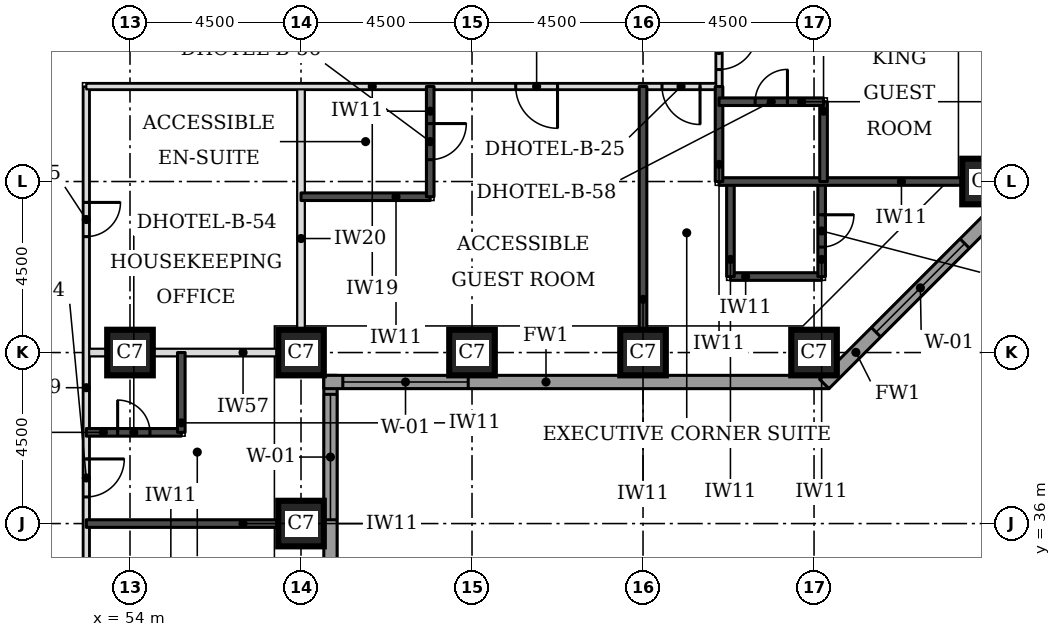
"""IFC4 building model, lengths in metres.
Left out: names, types, materials, properties, quantities, classifications, styles, units other than length and angle.
Written with IfcOpenShell. Run it as: python <this file> out.ifc"""

import sys

from ifc_helpers import new_model, si_unit, direction, frame, frame_2d, origin, origin_2d, place, context, subcontext, project, spatial, rectangle, extrude, element, fill, save


model = new_model("IFC4")
c1 = context("Model", 3, precision=1e-05, world=origin(), true_north=direction((0.0, 1.0)))
c2 = subcontext(c1, "Body", "Model", "MODEL_VIEW")
j1 = project(units=[si_unit("LENGTHUNIT", "METRE"), si_unit("PLANEANGLEUNIT", "RADIAN")], contexts=[c1])
p1 = place(None, origin())
s1 = spatial("IfcSite", under=j1, at=p1, CompositionType="ELEMENT")
p2 = place(p1, origin())
s2 = spatial("IfcBuilding", under=s1, at=p2, CompositionType="ELEMENT")
p3 = place(p2, frame((0.0, 0.0, 52.8)))
s3 = spatial("IfcBuildingStorey", under=s2, at=p3, CompositionType="ELEMENT", Elevation=52.8)
for number, where, z_axis, x_axis in (
    (1, (58.5, 36.0, 0.0), (0.0, 0.0, 1.0), (1.0, 0.0, 0.0)),
    (2, (54.0, 40.5, 0.0), (0.0, 0.0, 1.0), (1.0, 0.0, 0.0)),
    (3, (58.5, 40.5, 0.0), (0.0, 0.0, 1.0), (1.0, 0.0, 0.0)),
    (4, (63.0, 40.5, 0.0), (0.0, 0.0, 1.0), (1.0, 0.0, 0.0)),
    (5, (67.5, 40.5, 0.0), (0.0, 0.0, 1.0), (1.0, 0.0, 0.0)),
    (6, (72.0, 40.5, 0.0), (0.0, 0.0, 1.0), (1.0, 0.0, 0.0)),
    (7, (76.5, 45.0, 0.0), (0.0, 0.0, 1.0), (1.0, 0.0, 0.0)),
):
    element("IfcColumn", number, at=place(p3, frame(where, z_axis=z_axis, x_axis=x_axis)), inside=s3, PredefinedType="COLUMN", context=c2, shape_type="SweptSolid", body=[
        extrude(rectangle(XDim=1.2, YDim=1.2, at=origin_2d()), origin(), (0.0, 0.0, 1.0), 3.3),
    ])
p4 = place(p3, frame((59.275, 22.106, 0.0), z_axis=(0.0, 0.0, 1.0), x_axis=(0.0, 1.0, 0.0)))
e8 = element("IfcWall", 8, at=p4, inside=s3, PredefinedType="STANDARD", context=c2, shape_type="SweptSolid", body=[
    extrude(rectangle(XDim=17.793, YDim=0.35, at=frame_2d((8.897, 0.0))), origin(), (0.0, 0.0, 1.0), 3.055),
])
p5 = place(p4, frame((5.493, 0.0, 0.8)))
e9 = element("IfcOpeningElement", 9, at=p5, cuts=e8, PredefinedType="OPENING", context=c2, shape_type="SweptSolid", body=[
    extrude(rectangle(XDim=3.3, YDim=1.5, at=frame_2d((1.65, 0.75))), frame((0.0, 0.185, 0.0), z_axis=(0.0, -1.0, 0.0), x_axis=(1.0, 0.0, 0.0)), (0.0, 0.0, 1.0), 0.37),
])
p6 = place(p4, frame((13.993, 0.0, 0.8)))
e10 = element("IfcOpeningElement", 10, at=p6, cuts=e8, PredefinedType="OPENING", context=c2, shape_type="SweptSolid", body=[
    extrude(rectangle(XDim=3.3, YDim=1.5, at=frame_2d((1.65, 0.75))), frame((0.0, 0.185, 0.0), z_axis=(0.0, -1.0, 0.0), x_axis=(1.0, 0.0, 0.0)), (0.0, 0.0, 1.0), 0.37),
])
p7 = place(p3, frame((59.1, 39.725, 0.0), z_axis=(0.0, 0.0, 1.0), x_axis=(1.0, 0.0, 0.0)))
e11 = element("IfcWall", 11, at=p7, inside=s3, PredefinedType="STANDARD", context=c2, shape_type="SweptSolid", body=[
    extrude(rectangle(XDim=13.293, YDim=0.35, at=frame_2d((6.647, 0.0))), origin(), (0.0, 0.0, 1.0), 3.055),
])
p8 = place(p7, frame((0.5, 0.0, 0.8)))
e12 = element("IfcOpeningElement", 12, at=p8, cuts=e11, PredefinedType="OPENING", context=c2, shape_type="SweptSolid", body=[
    extrude(rectangle(XDim=3.3, YDim=1.5, at=frame_2d((1.65, 0.75))), frame((0.0, 0.185, 0.0), z_axis=(0.0, -1.0, 0.0), x_axis=(1.0, 0.0, 0.0)), (0.0, 0.0, 1.0), 0.37),
])
p9 = place(p3, frame((72.27, 39.674, 0.0), z_axis=(0.0, 0.0, 1.0), x_axis=(0.707106781187, 0.707106781187, 0.0)))
e13 = element("IfcWall", 13, at=p9, inside=s3, PredefinedType="STANDARD", context=c2, shape_type="SweptSolid", body=[
    extrude(rectangle(XDim=7.151, YDim=0.35, at=frame_2d((3.576, 0.0))), origin(), (0.0, 0.0, 1.0), 3.055),
])
p10 = place(p9, frame((1.926, 0.0, 0.8)))
e14 = element("IfcOpeningElement", 14, at=p10, cuts=e13, PredefinedType="OPENING", context=c2, shape_type="SweptSolid", body=[
    extrude(rectangle(XDim=3.3, YDim=1.5, at=frame_2d((1.65, 0.75))), frame((0.0, 0.185, 0.0), z_axis=(0.0, -1.0, 0.0), x_axis=(1.0, 0.0, 0.0)), (0.0, 0.0, 1.0), 0.37),
])
p11 = place(p3, frame((52.85, 40.5, 0.0), z_axis=(0.0, 0.0, 1.0), x_axis=(1.0, 0.0, 0.0)))
e15 = element("IfcWall", 15, at=p11, inside=s3, PredefinedType="PARTITIONING", context=c2, shape_type="SweptSolid", body=[
    extrude(rectangle(XDim=5.05, YDim=0.2, at=frame_2d((2.525, 0.0))), origin(), (0.0, 0.0, 1.0), 2.33),
])
p12 = place(p3, frame((58.5, 41.1, 0.0), z_axis=(0.0, 0.0, 1.0), x_axis=(0.0, 1.0, 0.0)))
e16 = element("IfcWall", 16, at=p12, inside=s3, PredefinedType="PARTITIONING", context=c2, shape_type="SweptSolid", body=[
    extrude(rectangle(XDim=6.4, YDim=0.2, at=frame_2d((3.2, 0.0))), origin(), (0.0, 0.0, 1.0), 3.08),
])
p13 = place(p3, frame((52.85, 23.65, 0.0), z_axis=(0.0, 0.0, 1.0), x_axis=(0.0, 1.0, 0.0)))
e17 = element("IfcWall", 17, at=p13, inside=s3, PredefinedType="PARTITIONING", context=c2, shape_type="SweptSolid", body=[
    extrude(rectangle(XDim=23.85, YDim=0.15, at=frame_2d((11.925, 0.0))), origin(), (0.0, 0.0, 1.0), 3.08),
])
p14 = place(p13, frame((1.65, 0.0, 0.0)))
e18 = element("IfcOpeningElement", 18, at=p14, cuts=e17, PredefinedType="OPENING", context=c2, shape_type="SweptSolid", body=[
    extrude(rectangle(XDim=1.0, YDim=2.1, at=frame_2d((0.5, 1.05))), frame((0.0, 0.085, 0.0), z_axis=(0.0, -1.0, 0.0), x_axis=(1.0, 0.0, 0.0)), (0.0, 0.0, 1.0), 0.17),
])
p15 = place(p13, frame((8.95, 0.0, 0.0)))
e19 = element("IfcOpeningElement", 19, at=p15, cuts=e17, PredefinedType="OPENING", context=c2, shape_type="SweptSolid", body=[
    extrude(rectangle(XDim=1.0, YDim=2.1, at=frame_2d((0.5, 1.05))), frame((0.0, 0.085, 0.0), z_axis=(0.0, -1.0, 0.0), x_axis=(1.0, 0.0, 0.0)), (0.0, 0.0, 1.0), 0.17),
])
p16 = place(p13, frame((13.05, 0.0, 0.0)))
e20 = element("IfcOpeningElement", 20, at=p16, cuts=e17, PredefinedType="OPENING", context=c2, shape_type="SweptSolid", body=[
    extrude(rectangle(XDim=1.0, YDim=2.1, at=frame_2d((0.5, 1.05))), frame((0.0, 0.085, 0.0), z_axis=(0.0, -1.0, 0.0), x_axis=(1.0, 0.0, 0.0)), (0.0, 0.0, 1.0), 0.17),
])
p17 = place(p13, frame((19.9, 0.0, 0.0)))
e21 = element("IfcOpeningElement", 21, at=p17, cuts=e17, PredefinedType="OPENING", context=c2, shape_type="SweptSolid", body=[
    extrude(rectangle(XDim=0.9, YDim=2.1, at=frame_2d((0.45, 1.05))), frame((0.0, 0.085, 0.0), z_axis=(0.0, -1.0, 0.0), x_axis=(1.0, 0.0, 0.0)), (0.0, 0.0, 1.0), 0.17),
])
p18 = place(p3, frame((52.85, 47.5, 0.0), z_axis=(0.0, 0.0, 1.0), x_axis=(1.0, 0.0, 0.0)))
e22 = element("IfcWall", 22, at=p18, inside=s3, PredefinedType="PARTITIONING", context=c2, shape_type="SweptSolid", body=[
    extrude(rectangle(XDim=16.65, YDim=0.15, at=frame_2d((8.325, 0.0))), origin(), (0.0, 0.0, 1.0), 3.08),
])
p19 = place(p18, frame((11.3, 0.0, 0.0)))
e23 = element("IfcOpeningElement", 23, at=p19, cuts=e22, PredefinedType="OPENING", context=c2, shape_type="SweptSolid", body=[
    extrude(rectangle(XDim=1.1, YDim=2.1, at=frame_2d((0.55, 1.05))), frame((0.0, 0.085, 0.0), z_axis=(0.0, -1.0, 0.0), x_axis=(1.0, 0.0, 0.0)), (0.0, 0.0, 1.0), 0.17),
])
p20 = place(p18, frame((15.15, 0.0, 0.0)))
e24 = element("IfcOpeningElement", 24, at=p20, cuts=e22, PredefinedType="OPENING", context=c2, shape_type="SweptSolid", body=[
    extrude(rectangle(XDim=1.0, YDim=2.1, at=frame_2d((0.5, 1.05))), frame((0.0, 0.085, 0.0), z_axis=(0.0, -1.0, 0.0), x_axis=(1.0, 0.0, 0.0)), (0.0, 0.0, 1.0), 0.17),
])
p21 = place(p3, frame((69.5, 47.5, 0.0), z_axis=(0.0, 0.0, 1.0), x_axis=(0.0, 1.0, 0.0)))
e25 = element("IfcWall", 25, at=p21, inside=s3, PredefinedType="PARTITIONING", context=c2, shape_type="SweptSolid", body=[
    extrude(rectangle(XDim=26.5, YDim=0.15, at=frame_2d((13.25, 0.0))), origin(), (0.0, 0.0, 1.0), 3.08),
])
p22 = place(p21, frame((24.95, 0.0, 0.0)))
e26 = element("IfcOpeningElement", 26, at=p22, cuts=e25, PredefinedType="OPENING", context=c2, shape_type="SweptSolid", body=[
    extrude(rectangle(XDim=1.0, YDim=2.1, at=frame_2d((0.5, 1.05))), frame((0.0, 0.085, 0.0), z_axis=(0.0, -1.0, 0.0), x_axis=(1.0, 0.0, 0.0)), (0.0, 0.0, 1.0), 0.17),
])
p23 = place(p21, frame((20.7, 0.0, 0.0)))
e27 = element("IfcOpeningElement", 27, at=p23, cuts=e25, PredefinedType="OPENING", context=c2, shape_type="SweptSolid", body=[
    extrude(rectangle(XDim=1.0, YDim=2.1, at=frame_2d((0.5, 1.05))), frame((0.0, 0.085, 0.0), z_axis=(0.0, -1.0, 0.0), x_axis=(1.0, 0.0, 0.0)), (0.0, 0.0, 1.0), 0.17),
])
p24 = place(p21, frame((18.55, 0.0, 0.0)))
e28 = element("IfcOpeningElement", 28, at=p24, cuts=e25, PredefinedType="OPENING", context=c2, shape_type="SweptSolid", body=[
    extrude(rectangle(XDim=1.0, YDim=2.1, at=frame_2d((0.5, 1.05))), frame((0.0, 0.085, 0.0), z_axis=(0.0, -1.0, 0.0), x_axis=(1.0, 0.0, 0.0)), (0.0, 0.0, 1.0), 0.17),
])
p25 = place(p21, frame((11.7, 0.0, 0.0)))
e29 = element("IfcOpeningElement", 29, at=p25, cuts=e25, PredefinedType="OPENING", context=c2, shape_type="SweptSolid", body=[
    extrude(rectangle(XDim=1.0, YDim=2.1, at=frame_2d((0.5, 1.05))), frame((0.0, 0.085, 0.0), z_axis=(0.0, -1.0, 0.0), x_axis=(1.0, 0.0, 0.0)), (0.0, 0.0, 1.0), 0.17),
])
p26 = place(p21, frame((7.65, 0.0, 0.0)))
e30 = element("IfcOpeningElement", 30, at=p26, cuts=e25, PredefinedType="OPENING", context=c2, shape_type="SweptSolid", body=[
    extrude(rectangle(XDim=1.1, YDim=2.1, at=frame_2d((0.55, 1.05))), frame((0.0, 0.085, 0.0), z_axis=(0.0, -1.0, 0.0), x_axis=(1.0, 0.0, 0.0)), (0.0, 0.0, 1.0), 0.17),
])
p27 = place(p21, frame((0.447, 0.0, 0.0)))
e31 = element("IfcOpeningElement", 31, at=p27, cuts=e25, PredefinedType="OPENING", context=c2, shape_type="SweptSolid", body=[
    extrude(rectangle(XDim=1.0, YDim=2.1, at=frame_2d((0.5, 1.05))), frame((0.0, 0.085, 0.0), z_axis=(0.0, -1.0, 0.0), x_axis=(1.0, 0.0, 0.0)), (0.0, 0.0, 1.0), 0.17),
])
p28 = place(p3, frame((52.85, 36.0, 0.0), z_axis=(0.0, 0.0, 1.0), x_axis=(1.0, 0.0, 0.0)))
e32 = element("IfcWall", 32, at=p28, inside=s3, PredefinedType="SOLIDWALL", context=c2, shape_type="SweptSolid", body=[
    extrude(rectangle(XDim=5.05, YDim=0.2, at=frame_2d((2.525, 0.0))), origin(), (0.0, 0.0, 1.0), 3.08),
])
p29 = place(p3, frame((52.85, 38.4, 0.0), z_axis=(0.0, 0.0, 1.0), x_axis=(1.0, 0.0, 0.0)))
e33 = element("IfcWall", 33, at=p29, inside=s3, PredefinedType="SOLIDWALL", context=c2, shape_type="SweptSolid", body=[
    extrude(rectangle(XDim=2.5, YDim=0.2, at=frame_2d((1.25, 0.0))), origin(), (0.0, 0.0, 1.0), 3.08),
])
p30 = place(p29, frame((0.825, 0.0, 0.0)))
e34 = element("IfcOpeningElement", 34, at=p30, cuts=e33, PredefinedType="OPENING", context=c2, shape_type="SweptSolid", body=[
    extrude(rectangle(XDim=0.85, YDim=2.1, at=frame_2d((0.425, 1.05))), frame((0.0, 0.11, 0.0), z_axis=(0.0, -1.0, 0.0), x_axis=(1.0, 0.0, 0.0)), (0.0, 0.0, 1.0), 0.22),
])
p31 = place(p3, frame((55.35, 38.4, 0.0), z_axis=(0.0, 0.0, 1.0), x_axis=(0.0, 1.0, 0.0)))
e35 = element("IfcWall", 35, at=p31, inside=s3, PredefinedType="SOLIDWALL", context=c2, shape_type="SweptSolid", body=[
    extrude(rectangle(XDim=2.1, YDim=0.2, at=frame_2d((1.05, 0.0))), origin(), (0.0, 0.0, 1.0), 3.08),
])
p32 = place(p3, frame((67.5, 41.1, 0.0), z_axis=(0.0, 0.0, 1.0), x_axis=(0.0, 1.0, 0.0)))
e36 = element("IfcWall", 36, at=p32, inside=s3, PredefinedType="SOLIDWALL", context=c2, shape_type="SweptSolid", body=[
    extrude(rectangle(XDim=6.4, YDim=0.2, at=frame_2d((3.2, 0.0))), origin(), (0.0, 0.0, 1.0), 3.08),
])
p33 = place(p3, frame((69.8, 42.5, 0.0), z_axis=(0.0, 0.0, 1.0), x_axis=(1.0, 0.0, 0.0)))
e37 = element("IfcWall", 37, at=p33, inside=s3, PredefinedType="SOLIDWALL", context=c2, shape_type="SweptSolid", body=[
    extrude(rectangle(XDim=2.4, YDim=0.2, at=frame_2d((1.2, 0.0))), origin(), (0.0, 0.0, 1.0), 3.08),
])
p34 = place(p3, frame((69.8, 42.5, 0.0), z_axis=(0.0, 0.0, 1.0), x_axis=(0.0, 1.0, 0.0)))
e38 = element("IfcWall", 38, at=p34, inside=s3, PredefinedType="SOLIDWALL", context=c2, shape_type="SweptSolid", body=[
    extrude(rectangle(XDim=2.5, YDim=0.2, at=frame_2d((1.25, 0.0))), origin(), (0.0, 0.0, 1.0), 3.08),
])
p35 = place(p3, frame((72.2, 42.5, 0.0), z_axis=(0.0, 0.0, 1.0), x_axis=(0.0, 1.0, 0.0)))
e39 = element("IfcWall", 39, at=p35, inside=s3, PredefinedType="SOLIDWALL", context=c2, shape_type="SweptSolid", body=[
    extrude(rectangle(XDim=2.5, YDim=0.2, at=frame_2d((1.25, 0.0))), origin(), (0.0, 0.0, 1.0), 3.08),
])
p36 = place(p35, frame((0.775, 0.0, 0.0)))
e40 = element("IfcOpeningElement", 40, at=p36, cuts=e39, PredefinedType="OPENING", context=c2, shape_type="SweptSolid", body=[
    extrude(rectangle(XDim=0.85, YDim=2.1, at=frame_2d((0.425, 1.05))), frame((0.0, 0.11, 0.0), z_axis=(0.0, -1.0, 0.0), x_axis=(1.0, 0.0, 0.0)), (0.0, 0.0, 1.0), 0.22),
])
p37 = place(p3, frame((58.5, 44.6, 0.0), z_axis=(0.0, 0.0, 1.0), x_axis=(1.0, 0.0, 0.0)))
e41 = element("IfcWall", 41, at=p37, inside=s3, PredefinedType="SOLIDWALL", context=c2, shape_type="SweptSolid", body=[
    extrude(rectangle(XDim=3.4, YDim=0.2, at=frame_2d((1.7, 0.0))), origin(), (0.0, 0.0, 1.0), 3.08),
])
p38 = place(p3, frame((61.9, 44.6, 0.0), z_axis=(0.0, 0.0, 1.0), x_axis=(0.0, 1.0, 0.0)))
e42 = element("IfcWall", 42, at=p38, inside=s3, PredefinedType="SOLIDWALL", context=c2, shape_type="SweptSolid", body=[
    extrude(rectangle(XDim=2.9, YDim=0.2, at=frame_2d((1.45, 0.0))), origin(), (0.0, 0.0, 1.0), 3.08),
])
p39 = place(p38, frame((0.975, 0.0, 0.0)))
e43 = element("IfcOpeningElement", 43, at=p39, cuts=e42, PredefinedType="OPENING", context=c2, shape_type="SweptSolid", body=[
    extrude(rectangle(XDim=0.95, YDim=2.1, at=frame_2d((0.475, 1.05))), frame((0.0, 0.11, 0.0), z_axis=(0.0, -1.0, 0.0), x_axis=(1.0, 0.0, 0.0)), (0.0, 0.0, 1.0), 0.22),
])
p40 = place(p3, frame((69.5, 45.0, 0.0), z_axis=(0.0, 0.0, 1.0), x_axis=(1.0, 0.0, 0.0)))
e44 = element("IfcWall", 44, at=p40, inside=s3, PredefinedType="SOLIDWALL", context=c2, shape_type="SweptSolid", body=[
    extrude(rectangle(XDim=6.4, YDim=0.2, at=frame_2d((3.2, 0.0))), origin(), (0.0, 0.0, 1.0), 3.08),
])
p41 = place(p3, frame((69.5, 45.0, 0.0), z_axis=(0.0, 0.0, 1.0), x_axis=(0.0, 1.0, 0.0)))
e45 = element("IfcWall", 45, at=p41, inside=s3, PredefinedType="SOLIDWALL", context=c2, shape_type="SweptSolid", body=[
    extrude(rectangle(XDim=2.5, YDim=0.2, at=frame_2d((1.25, 0.0))), origin(), (0.0, 0.0, 1.0), 3.08),
])
p42 = place(p3, frame((72.25, 45.0, 0.0), z_axis=(0.0, 0.0, 1.0), x_axis=(0.0, 1.0, 0.0)))
e46 = element("IfcWall", 46, at=p42, inside=s3, PredefinedType="SOLIDWALL", context=c2, shape_type="SweptSolid", body=[
    extrude(rectangle(XDim=2.1, YDim=0.2, at=frame_2d((1.05, 0.0))), origin(), (0.0, 0.0, 1.0), 3.08),
])
p43 = place(p3, frame((69.5, 47.1, 0.0), z_axis=(0.0, 0.0, 1.0), x_axis=(1.0, 0.0, 0.0)))
e47 = element("IfcWall", 47, at=p43, inside=s3, PredefinedType="SOLIDWALL", context=c2, shape_type="SweptSolid", body=[
    extrude(rectangle(XDim=2.75, YDim=0.2, at=frame_2d((1.375, 0.0))), origin(), (0.0, 0.0, 1.0), 3.08),
])
p44 = place(p43, frame((0.95, 0.0, 0.0)))
e48 = element("IfcOpeningElement", 48, at=p44, cuts=e47, PredefinedType="OPENING", context=c2, shape_type="SweptSolid", body=[
    extrude(rectangle(XDim=0.85, YDim=2.1, at=frame_2d((0.425, 1.05))), frame((0.0, 0.11, 0.0), z_axis=(0.0, -1.0, 0.0), x_axis=(1.0, 0.0, 0.0)), (0.0, 0.0, 1.0), 0.22),
])
p45 = place(p6, origin())
e49 = element("IfcWindow", 49, at=p45, inside=s3, PartitioningType="SINGLE_PANEL", PredefinedType="WINDOW", context=c2, shape_type="SweptSolid", body=[
    extrude(rectangle(XDim=3.3, YDim=1.5, at=frame_2d((1.65, 0.75))), frame((0.0, 0.085, 0.0), z_axis=(0.0, -1.0, 0.0), x_axis=(1.0, 0.0, 0.0)), (0.0, 0.0, 1.0), 0.06),
])
fill(e10, e49)
p46 = place(p8, origin())
e50 = element("IfcWindow", 50, at=p46, inside=s3, PartitioningType="SINGLE_PANEL", PredefinedType="WINDOW", context=c2, shape_type="SweptSolid", body=[
    extrude(rectangle(XDim=3.3, YDim=1.5, at=frame_2d((1.65, 0.75))), frame((0.0, 0.085, 0.0), z_axis=(0.0, -1.0, 0.0), x_axis=(1.0, 0.0, 0.0)), (0.0, 0.0, 1.0), 0.06),
])
fill(e12, e50)
p47 = place(p10, origin())
e51 = element("IfcWindow", 51, at=p47, inside=s3, PartitioningType="SINGLE_PANEL", PredefinedType="WINDOW", context=c2, shape_type="SweptSolid", body=[
    extrude(rectangle(XDim=3.3, YDim=1.5, at=frame_2d((1.65, 0.75))), frame((0.0, 0.085, 0.0), z_axis=(0.0, -1.0, 0.0), x_axis=(1.0, 0.0, 0.0)), (0.0, 0.0, 1.0), 0.06),
])
fill(e14, e51)
p48 = place(p16, frame((1.0, 0.0, 0.0), z_axis=(0.0, 0.0, 1.0), x_axis=(-1.0, 0.0, 0.0)))
e52 = element("IfcDoor", 52, at=p48, inside=s3, OperationType="SINGLE_SWING_LEFT", PredefinedType="DOOR", context=c2, shape_type="SweptSolid", body=[
    extrude(rectangle(XDim=1.0, YDim=2.1, at=frame_2d((0.5, 1.05))), frame((0.0, 0.025, 0.0), z_axis=(0.0, -1.0, 0.0), x_axis=(1.0, 0.0, 0.0)), (0.0, 0.0, 1.0), 0.05),
])
fill(e20, e52)
p49 = place(p30, origin())
e53 = element("IfcDoor", 53, at=p49, inside=s3, OperationType="SINGLE_SWING_LEFT", PredefinedType="DOOR", context=c2, shape_type="SweptSolid", body=[
    extrude(rectangle(XDim=0.85, YDim=2.1, at=frame_2d((0.425, 1.05))), frame((0.0, 0.025, 0.0), z_axis=(0.0, -1.0, 0.0), x_axis=(1.0, 0.0, 0.0)), (0.0, 0.0, 1.0), 0.05),
])
fill(e34, e53)
p50 = place(p27, frame((1.0, 0.0, 0.0), z_axis=(0.0, 0.0, 1.0), x_axis=(-1.0, 0.0, 0.0)))
e54 = element("IfcDoor", 54, at=p50, inside=s3, OperationType="SINGLE_SWING_LEFT", PredefinedType="DOOR", context=c2, shape_type="SweptSolid", body=[
    extrude(rectangle(XDim=1.0, YDim=2.1, at=frame_2d((0.5, 1.05))), frame((0.0, 0.025, 0.0), z_axis=(0.0, -1.0, 0.0), x_axis=(1.0, 0.0, 0.0)), (0.0, 0.0, 1.0), 0.05),
])
fill(e31, e54)
p51 = place(p44, origin())
e55 = element("IfcDoor", 55, at=p51, inside=s3, OperationType="SINGLE_SWING_RIGHT", PredefinedType="DOOR", context=c2, shape_type="SweptSolid", body=[
    extrude(rectangle(XDim=0.85, YDim=2.1, at=frame_2d((0.425, 1.05))), frame((0.0, 0.025, 0.0), z_axis=(0.0, -1.0, 0.0), x_axis=(1.0, 0.0, 0.0)), (0.0, 0.0, 1.0), 0.05),
])
fill(e48, e55)
p52 = place(p19, frame((1.1, 0.0, 0.0), z_axis=(0.0, 0.0, 1.0), x_axis=(-1.0, 0.0, 0.0)))
e56 = element("IfcDoor", 56, at=p52, inside=s3, OperationType="SINGLE_SWING_LEFT", PredefinedType="DOOR", context=c2, shape_type="SweptSolid", body=[
    extrude(rectangle(XDim=1.1, YDim=2.1, at=frame_2d((0.55, 1.05))), frame((0.0, 0.025, 0.0), z_axis=(0.0, -1.0, 0.0), x_axis=(1.0, 0.0, 0.0)), (0.0, 0.0, 1.0), 0.05),
])
fill(e23, e56)
p53 = place(p39, frame((0.95, 0.0, 0.0), z_axis=(0.0, 0.0, 1.0), x_axis=(-1.0, 0.0, 0.0)))
e57 = element("IfcDoor", 57, at=p53, inside=s3, OperationType="SINGLE_SWING_LEFT", PredefinedType="DOOR", context=c2, shape_type="SweptSolid", body=[
    extrude(rectangle(XDim=0.95, YDim=2.1, at=frame_2d((0.475, 1.05))), frame((0.0, 0.025, 0.0), z_axis=(0.0, -1.0, 0.0), x_axis=(1.0, 0.0, 0.0)), (0.0, 0.0, 1.0), 0.05),
])
fill(e43, e57)
p54 = place(p20, frame((1.0, 0.0, 0.0), z_axis=(0.0, 0.0, 1.0), x_axis=(-1.0, 0.0, 0.0)))
e58 = element("IfcDoor", 58, at=p54, inside=s3, OperationType="SINGLE_SWING_LEFT", PredefinedType="DOOR", context=c2, shape_type="SweptSolid", body=[
    extrude(rectangle(XDim=1.0, YDim=2.1, at=frame_2d((0.5, 1.05))), frame((0.0, 0.025, 0.0), z_axis=(0.0, -1.0, 0.0), x_axis=(1.0, 0.0, 0.0)), (0.0, 0.0, 1.0), 0.05),
])
fill(e24, e58)
p55 = place(p36, frame((0.85, 0.0, 0.0), z_axis=(0.0, 0.0, 1.0), x_axis=(-1.0, 0.0, 0.0)))
e59 = element("IfcDoor", 59, at=p55, inside=s3, OperationType="SINGLE_SWING_LEFT", PredefinedType="DOOR", context=c2, shape_type="SweptSolid", body=[
    extrude(rectangle(XDim=0.85, YDim=2.1, at=frame_2d((0.425, 1.05))), frame((0.0, 0.025, 0.0), z_axis=(0.0, -1.0, 0.0), x_axis=(1.0, 0.0, 0.0)), (0.0, 0.0, 1.0), 0.05),
])
fill(e40, e59)
p56 = place(p17, frame((0.9, 0.0, 0.0), z_axis=(0.0, 0.0, 1.0), x_axis=(-1.0, 0.0, 0.0)))
e60 = element("IfcDoor", 60, at=p56, inside=s3, OperationType="SINGLE_SWING_LEFT", PredefinedType="DOOR", context=c2, shape_type="SweptSolid", body=[
    extrude(rectangle(XDim=0.9, YDim=2.1, at=frame_2d((0.45, 1.05))), frame((0.0, 0.025, 0.0), z_axis=(0.0, -1.0, 0.0), x_axis=(1.0, 0.0, 0.0)), (0.0, 0.0, 1.0), 0.05),
])
fill(e21, e60)
save(model, sys.argv[1])
